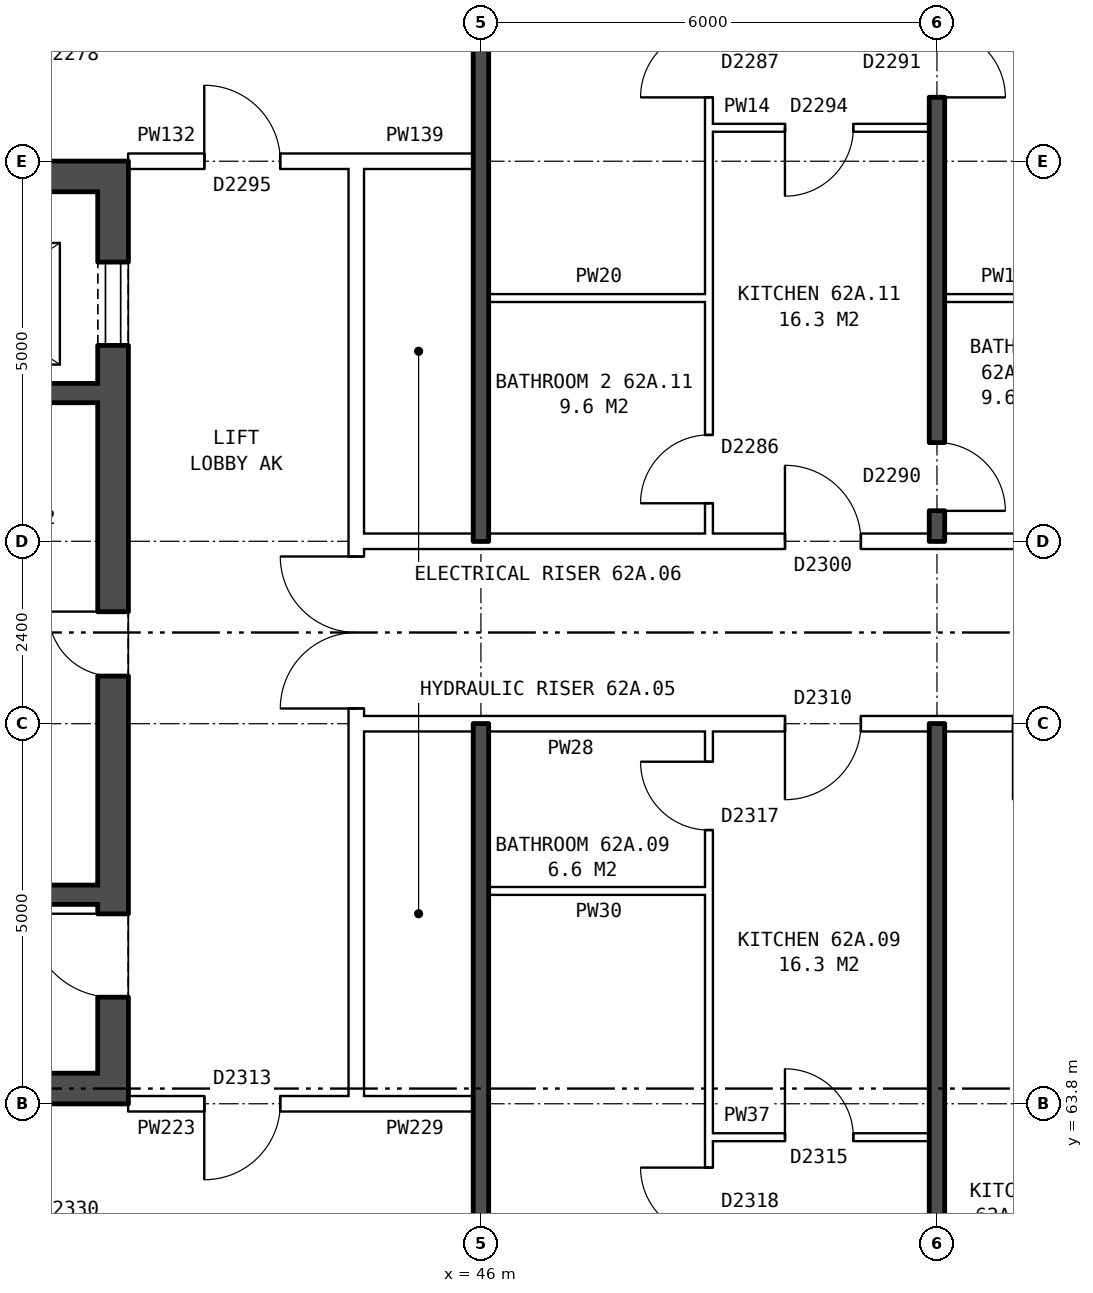
"""IFC4 building model, lengths in metres.
Left out: names, types, materials, properties, quantities, classifications, styles, units other than length and angle.
Written with IfcOpenShell. Run it as: python <this file> out.ifc"""

import sys

from ifc_helpers import new_model, si_unit, direction, frame, frame_2d, origin, place, context, subcontext, project, spatial, rectangle, extrude, element, fill, save


model = new_model("IFC4")
c1 = context("Model", 3, precision=1e-05, world=origin(), true_north=direction((0.0, 1.0)))
c2 = subcontext(c1, "Body", "Model", "MODEL_VIEW")
j1 = project(units=[si_unit("LENGTHUNIT", "METRE"), si_unit("PLANEANGLEUNIT", "RADIAN")], contexts=[c1])
p1 = place(None, origin())
s1 = spatial("IfcSite", under=j1, at=p1, CompositionType="ELEMENT")
p2 = place(p1, origin())
s2 = spatial("IfcBuilding", under=s1, at=p2, CompositionType="ELEMENT")
p3 = place(p2, frame((0.0, 0.0, 221.4)))
s3 = spatial("IfcBuildingStorey", under=s2, at=p3, CompositionType="ELEMENT", Elevation=221.4)
p4 = place(p3, frame((41.16, 76.2, 0.0), z_axis=(0.0, 0.0, 1.0), x_axis=(0.0, -1.0, 0.0)))
e1 = element("IfcWall", 1, at=p4, inside=s3, PredefinedType="SHEAR", context=c2, shape_type="SweptSolid", body=[
    extrude(rectangle(XDim=12.4, YDim=0.4, at=frame_2d((6.2, 0.0))), origin(), (0.0, 0.0, 1.0), 2.85),
])
p5 = place(p4, frame((1.325, 0.0, 0.0)))
e2 = element("IfcOpeningElement", 2, at=p5, cuts=e1, PredefinedType="OPENING", context=c2, shape_type="SweptSolid", body=[
    extrude(rectangle(XDim=1.1, YDim=2.1, at=frame_2d((0.55, 1.05))), frame((0.0, 0.21, 0.0), z_axis=(0.0, -1.0, 0.0), x_axis=(1.0, 0.0, 0.0)), (0.0, 0.0, 1.0), 0.42),
])
p6 = place(p4, frame((5.925, 0.0, 0.0)))
e3 = element("IfcOpeningElement", 3, at=p6, cuts=e1, PredefinedType="OPENING", context=c2, shape_type="SweptSolid", body=[
    extrude(rectangle(XDim=0.85, YDim=2.1, at=frame_2d((0.425, 1.05))), frame((0.0, 0.21, 0.0), z_axis=(0.0, -1.0, 0.0), x_axis=(1.0, 0.0, 0.0)), (0.0, 0.0, 1.0), 0.42),
])
p7 = place(p4, frame((9.9, 0.0, 0.0)))
e4 = element("IfcOpeningElement", 4, at=p7, cuts=e1, PredefinedType="OPENING", context=c2, shape_type="SweptSolid", body=[
    extrude(rectangle(XDim=1.1, YDim=2.1, at=frame_2d((0.55, 1.05))), frame((0.0, 0.21, 0.0), z_axis=(0.0, -1.0, 0.0), x_axis=(1.0, 0.0, 0.0)), (0.0, 0.0, 1.0), 0.42),
])
for number, where, z_axis, x_axis in (
    (5, (40.96, 76.0, 0.0), (0.0, 0.0, 1.0), (-1.0, 0.0, 0.0)),
    (6, (40.96, 64.0, 0.0), (0.0, 0.0, 1.0), (-1.0, 0.0, 0.0)),
):
    element("IfcWall", number, at=place(p3, frame(where, z_axis=z_axis, x_axis=x_axis)), inside=s3, PredefinedType="SHEAR", context=c2, shape_type="SweptSolid", body=[
        extrude(rectangle(XDim=8.2, YDim=0.4, at=frame_2d((4.1, 0.0))), origin(), (0.0, 0.0, 1.0), 2.85),
    ])
p8 = place(p3, frame((40.96, 73.15, 0.0), z_axis=(0.0, 0.0, 1.0), x_axis=(-1.0, 0.0, 0.0)))
e7 = element("IfcWall", 7, at=p8, inside=s3, PredefinedType="SHEAR", context=c2, shape_type="SweptSolid", body=[
    extrude(rectangle(XDim=3.595, YDim=0.25, at=frame_2d((1.797, 0.0))), origin(), (0.0, 0.0, 1.0), 2.85),
])
p9 = place(p3, frame((40.96, 66.55, 0.0), z_axis=(0.0, 0.0, 1.0), x_axis=(-1.0, 0.0, 0.0)))
e8 = element("IfcWall", 8, at=p9, inside=s3, PredefinedType="SHEAR", context=c2, shape_type="SweptSolid", body=[
    extrude(rectangle(XDim=2.525, YDim=0.25, at=frame_2d((1.262, 0.0))), origin(), (0.0, 0.0, 1.0), 2.85),
])
p10 = place(p3, frame((44.36, 63.9, 0.0), z_axis=(0.0, 0.0, 1.0), x_axis=(0.0, 1.0, 0.0)))
e9 = element("IfcWall", 9, at=p10, inside=s3, PredefinedType="PARTITIONING", context=c2, shape_type="SweptSolid", body=[
    extrude(rectangle(XDim=12.2, YDim=0.2, at=frame_2d((6.1, 0.0))), origin(), (0.0, 0.0, 1.0), 2.85),
])
p11 = place(p10, frame((5.1, 0.0, 0.0)))
e10 = element("IfcOpeningElement", 10, at=p11, cuts=e9, PredefinedType="OPENING", context=c2, shape_type="SweptSolid", body=[
    extrude(rectangle(XDim=2.0, YDim=2.1, at=frame_2d((1.0, 1.05))), frame((0.0, 0.11, 0.0), z_axis=(0.0, -1.0, 0.0), x_axis=(1.0, 0.0, 0.0)), (0.0, 0.0, 1.0), 0.22),
])
p12 = place(p3, frame((49.0, 63.36, 0.0), z_axis=(0.0, 0.0, 1.0), x_axis=(1.0, 0.0, 0.0)))
e11 = element("IfcWall", 11, at=p12, inside=s3, PredefinedType="PARTITIONING", context=c2, shape_type="SweptSolid", body=[
    extrude(rectangle(XDim=2.9, YDim=0.1, at=frame_2d((1.45, 0.0))), origin(), (0.0, 0.0, 1.0), 2.85),
])
p13 = place(p12, frame((1.0, 0.0, 0.0)))
e12 = element("IfcOpeningElement", 12, at=p13, cuts=e11, PredefinedType="OPENING", context=c2, shape_type="SweptSolid", body=[
    extrude(rectangle(XDim=0.9, YDim=2.1, at=frame_2d((0.45, 1.05))), frame((0.0, 0.06, 0.0), z_axis=(0.0, -1.0, 0.0), x_axis=(1.0, 0.0, 0.0)), (0.0, 0.0, 1.0), 0.12),
])
p14 = place(p3, frame((41.36, 63.8, 0.0), z_axis=(0.0, 0.0, 1.0), x_axis=(1.0, 0.0, 0.0)))
e13 = element("IfcWall", 13, at=p14, inside=s3, PredefinedType="PARTITIONING", context=c2, shape_type="SweptSolid", body=[
    extrude(rectangle(XDim=3.0, YDim=0.2, at=frame_2d((1.5, 0.0))), origin(), (0.0, 0.0, 1.0), 2.85),
])
p15 = place(p14, frame((1.0, 0.0, 0.0)))
e14 = element("IfcOpeningElement", 14, at=p15, cuts=e13, PredefinedType="OPENING", context=c2, shape_type="SweptSolid", body=[
    extrude(rectangle(XDim=1.0, YDim=2.1, at=frame_2d((0.5, 1.05))), frame((0.0, 0.11, 0.0), z_axis=(0.0, -1.0, 0.0), x_axis=(1.0, 0.0, 0.0)), (0.0, 0.0, 1.0), 0.22),
])
p16 = place(p3, frame((44.36, 63.8, 0.0), z_axis=(0.0, 0.0, 1.0), x_axis=(1.0, 0.0, 0.0)))
e15 = element("IfcWall", 15, at=p16, inside=s3, PredefinedType="PARTITIONING", context=c2, shape_type="SweptSolid", body=[
    extrude(rectangle(XDim=1.54, YDim=0.2, at=frame_2d((0.77, 0.0))), origin(), (0.0, 0.0, 1.0), 2.85),
])
p17 = place(p3, frame((46.1, 66.6, 0.0), z_axis=(0.0, 0.0, 1.0), x_axis=(1.0, 0.0, 0.0)))
e16 = element("IfcWall", 16, at=p17, inside=s3, PredefinedType="PARTITIONING", context=c2, shape_type="SweptSolid", body=[
    extrude(rectangle(XDim=2.9, YDim=0.1, at=frame_2d((1.45, 0.0))), origin(), (0.0, 0.0, 1.0), 2.85),
])
p18 = place(p3, frame((44.36, 68.8, 0.0), z_axis=(0.0, 0.0, 1.0), x_axis=(1.0, 0.0, 0.0)))
e17 = element("IfcWall", 17, at=p18, inside=s3, PredefinedType="PARTITIONING", context=c2, shape_type="SweptSolid", body=[
    extrude(rectangle(XDim=19.28, YDim=0.2, at=frame_2d((9.64, 0.0))), origin(), (0.0, 0.0, 1.0), 2.85),
])
p19 = place(p18, frame((14.64, 0.0, 0.0)))
e18 = element("IfcOpeningElement", 18, at=p19, cuts=e17, PredefinedType="OPENING", context=c2, shape_type="SweptSolid", body=[
    extrude(rectangle(XDim=1.0, YDim=2.1, at=frame_2d((0.5, 1.05))), frame((0.0, 0.11, 0.0), z_axis=(0.0, -1.0, 0.0), x_axis=(1.0, 0.0, 0.0)), (0.0, 0.0, 1.0), 0.22),
])
p20 = place(p18, frame((8.64, 0.0, 0.0)))
e19 = element("IfcOpeningElement", 19, at=p20, cuts=e17, PredefinedType="OPENING", context=c2, shape_type="SweptSolid", body=[
    extrude(rectangle(XDim=1.0, YDim=2.1, at=frame_2d((0.5, 1.05))), frame((0.0, 0.11, 0.0), z_axis=(0.0, -1.0, 0.0), x_axis=(1.0, 0.0, 0.0)), (0.0, 0.0, 1.0), 0.22),
])
p21 = place(p18, frame((5.64, 0.0, 0.0)))
e20 = element("IfcOpeningElement", 20, at=p21, cuts=e17, PredefinedType="OPENING", context=c2, shape_type="SweptSolid", body=[
    extrude(rectangle(XDim=1.0, YDim=2.1, at=frame_2d((0.5, 1.05))), frame((0.0, 0.11, 0.0), z_axis=(0.0, -1.0, 0.0), x_axis=(1.0, 0.0, 0.0)), (0.0, 0.0, 1.0), 0.22),
])
p22 = place(p3, frame((44.36, 71.2, 0.0), z_axis=(0.0, 0.0, 1.0), x_axis=(1.0, 0.0, 0.0)))
e21 = element("IfcWall", 21, at=p22, inside=s3, PredefinedType="PARTITIONING", context=c2, shape_type="SweptSolid", body=[
    extrude(rectangle(XDim=19.28, YDim=0.2, at=frame_2d((9.64, 0.0))), origin(), (0.0, 0.0, 1.0), 2.85),
])
p23 = place(p22, frame((14.64, 0.0, 0.0)))
e22 = element("IfcOpeningElement", 22, at=p23, cuts=e21, PredefinedType="OPENING", context=c2, shape_type="SweptSolid", body=[
    extrude(rectangle(XDim=1.0, YDim=2.1, at=frame_2d((0.5, 1.05))), frame((0.0, 0.11, 0.0), z_axis=(0.0, -1.0, 0.0), x_axis=(1.0, 0.0, 0.0)), (0.0, 0.0, 1.0), 0.22),
])
p24 = place(p22, frame((5.64, 0.0, 0.0)))
e23 = element("IfcOpeningElement", 23, at=p24, cuts=e21, PredefinedType="OPENING", context=c2, shape_type="SweptSolid", body=[
    extrude(rectangle(XDim=1.0, YDim=2.1, at=frame_2d((0.5, 1.05))), frame((0.0, 0.11, 0.0), z_axis=(0.0, -1.0, 0.0), x_axis=(1.0, 0.0, 0.0)), (0.0, 0.0, 1.0), 0.22),
])
p25 = place(p3, frame((46.1, 74.4, 0.0), z_axis=(0.0, 0.0, 1.0), x_axis=(1.0, 0.0, 0.0)))
e24 = element("IfcWall", 24, at=p25, inside=s3, PredefinedType="PARTITIONING", context=c2, shape_type="SweptSolid", body=[
    extrude(rectangle(XDim=2.9, YDim=0.1, at=frame_2d((1.45, 0.0))), origin(), (0.0, 0.0, 1.0), 2.85),
])
p26 = place(p3, frame((52.1, 74.4, 0.0), z_axis=(0.0, 0.0, 1.0), x_axis=(1.0, 0.0, 0.0)))
e25 = element("IfcWall", 25, at=p26, inside=s3, PredefinedType="PARTITIONING", context=c2, shape_type="SweptSolid", body=[
    extrude(rectangle(XDim=2.8, YDim=0.1, at=frame_2d((1.4, 0.0))), origin(), (0.0, 0.0, 1.0), 2.85),
])
p27 = place(p3, frame((41.36, 76.2, 0.0), z_axis=(0.0, 0.0, 1.0), x_axis=(1.0, 0.0, 0.0)))
e26 = element("IfcWall", 26, at=p27, inside=s3, PredefinedType="PARTITIONING", context=c2, shape_type="SweptSolid", body=[
    extrude(rectangle(XDim=3.0, YDim=0.2, at=frame_2d((1.5, 0.0))), origin(), (0.0, 0.0, 1.0), 2.85),
])
p28 = place(p27, frame((1.0, 0.0, 0.0)))
e27 = element("IfcOpeningElement", 27, at=p28, cuts=e26, PredefinedType="OPENING", context=c2, shape_type="SweptSolid", body=[
    extrude(rectangle(XDim=1.0, YDim=2.1, at=frame_2d((0.5, 1.05))), frame((0.0, 0.11, 0.0), z_axis=(0.0, -1.0, 0.0), x_axis=(1.0, 0.0, 0.0)), (0.0, 0.0, 1.0), 0.22),
])
p29 = place(p3, frame((44.36, 76.2, 0.0), z_axis=(0.0, 0.0, 1.0), x_axis=(1.0, 0.0, 0.0)))
e28 = element("IfcWall", 28, at=p29, inside=s3, PredefinedType="PARTITIONING", context=c2, shape_type="SweptSolid", body=[
    extrude(rectangle(XDim=1.54, YDim=0.2, at=frame_2d((0.77, 0.0))), origin(), (0.0, 0.0, 1.0), 2.85),
])
p30 = place(p3, frame((49.0, 76.64, 0.0), z_axis=(0.0, 0.0, 1.0), x_axis=(1.0, 0.0, 0.0)))
e29 = element("IfcWall", 29, at=p30, inside=s3, PredefinedType="PARTITIONING", context=c2, shape_type="SweptSolid", body=[
    extrude(rectangle(XDim=2.9, YDim=0.1, at=frame_2d((1.45, 0.0))), origin(), (0.0, 0.0, 1.0), 2.85),
])
p31 = place(p30, frame((1.0, 0.0, 0.0)))
e30 = element("IfcOpeningElement", 30, at=p31, cuts=e29, PredefinedType="OPENING", context=c2, shape_type="SweptSolid", body=[
    extrude(rectangle(XDim=0.9, YDim=2.1, at=frame_2d((0.45, 1.05))), frame((0.0, 0.06, 0.0), z_axis=(0.0, -1.0, 0.0), x_axis=(1.0, 0.0, 0.0)), (0.0, 0.0, 1.0), 0.12),
])
for number, where, z_axis, x_axis in (
    (31, (46.0, 54.36, 0.0), (0.0, 0.0, 1.0), (0.0, 1.0, 0.0)),
    (32, (46.0, 71.2, 0.0), (0.0, 0.0, 1.0), (0.0, 1.0, 0.0)),
):
    element("IfcWall", number, at=place(p3, frame(where, z_axis=z_axis, x_axis=x_axis)), inside=s3, PredefinedType="SOLIDWALL", context=c2, shape_type="SweptSolid", body=[
        extrude(rectangle(XDim=14.44, YDim=0.2, at=frame_2d((7.22, 0.0))), origin(), (0.0, 0.0, 1.0), 2.85),
    ])
p32 = place(p3, frame((49.0, 54.36, 0.0), z_axis=(0.0, 0.0, 1.0), x_axis=(0.0, 1.0, 0.0)))
e33 = element("IfcWall", 33, at=p32, inside=s3, PredefinedType="PARTITIONING", context=c2, shape_type="SweptSolid", body=[
    extrude(rectangle(XDim=14.34, YDim=0.1, at=frame_2d((7.17, 0.0))), origin(), (0.0, 0.0, 1.0), 2.85),
])
p33 = place(p32, frame((7.7, 0.0, 0.0)))
e34 = element("IfcOpeningElement", 34, at=p33, cuts=e33, PredefinedType="OPENING", context=c2, shape_type="SweptSolid", body=[
    extrude(rectangle(XDim=0.9, YDim=2.1, at=frame_2d((0.45, 1.05))), frame((0.0, 0.06, 0.0), z_axis=(0.0, -1.0, 0.0), x_axis=(1.0, 0.0, 0.0)), (0.0, 0.0, 1.0), 0.12),
])
p34 = place(p32, frame((13.04, 0.0, 0.0)))
e35 = element("IfcOpeningElement", 35, at=p34, cuts=e33, PredefinedType="OPENING", context=c2, shape_type="SweptSolid", body=[
    extrude(rectangle(XDim=0.9, YDim=2.1, at=frame_2d((0.45, 1.05))), frame((0.0, 0.06, 0.0), z_axis=(0.0, -1.0, 0.0), x_axis=(1.0, 0.0, 0.0)), (0.0, 0.0, 1.0), 0.12),
])
p35 = place(p3, frame((49.0, 71.3, 0.0), z_axis=(0.0, 0.0, 1.0), x_axis=(0.0, 1.0, 0.0)))
e36 = element("IfcWall", 36, at=p35, inside=s3, PredefinedType="PARTITIONING", context=c2, shape_type="SweptSolid", body=[
    extrude(rectangle(XDim=14.34, YDim=0.1, at=frame_2d((7.17, 0.0))), origin(), (0.0, 0.0, 1.0), 2.85),
])
p36 = place(p35, frame((5.74, 0.0, 0.0)))
e37 = element("IfcOpeningElement", 37, at=p36, cuts=e36, PredefinedType="OPENING", context=c2, shape_type="SweptSolid", body=[
    extrude(rectangle(XDim=0.9, YDim=2.1, at=frame_2d((0.45, 1.05))), frame((0.0, 0.06, 0.0), z_axis=(0.0, -1.0, 0.0), x_axis=(1.0, 0.0, 0.0)), (0.0, 0.0, 1.0), 0.12),
])
p37 = place(p35, frame((0.4, 0.0, 0.0)))
e38 = element("IfcOpeningElement", 38, at=p37, cuts=e36, PredefinedType="OPENING", context=c2, shape_type="SweptSolid", body=[
    extrude(rectangle(XDim=0.9, YDim=2.1, at=frame_2d((0.45, 1.05))), frame((0.0, 0.06, 0.0), z_axis=(0.0, -1.0, 0.0), x_axis=(1.0, 0.0, 0.0)), (0.0, 0.0, 1.0), 0.12),
])
p38 = place(p3, frame((52.0, 54.36, 0.0), z_axis=(0.0, 0.0, 1.0), x_axis=(0.0, 1.0, 0.0)))
e39 = element("IfcWall", 39, at=p38, inside=s3, PredefinedType="SOLIDWALL", context=c2, shape_type="SweptSolid", body=[
    extrude(rectangle(XDim=14.44, YDim=0.2, at=frame_2d((7.22, 0.0))), origin(), (0.0, 0.0, 1.0), 2.85),
])
p39 = place(p3, frame((52.0, 71.2, 0.0), z_axis=(0.0, 0.0, 1.0), x_axis=(0.0, 1.0, 0.0)))
e40 = element("IfcWall", 40, at=p39, inside=s3, PredefinedType="SOLIDWALL", context=c2, shape_type="SweptSolid", body=[
    extrude(rectangle(XDim=14.44, YDim=0.2, at=frame_2d((7.22, 0.0))), origin(), (0.0, 0.0, 1.0), 2.85),
])
p40 = place(p39, frame((5.84, 0.0, 0.0)))
e41 = element("IfcOpeningElement", 41, at=p40, cuts=e40, PredefinedType="OPENING", context=c2, shape_type="SweptSolid", body=[
    extrude(rectangle(XDim=0.9, YDim=2.1, at=frame_2d((0.45, 1.05))), frame((0.0, 0.11, 0.0), z_axis=(0.0, -1.0, 0.0), x_axis=(1.0, 0.0, 0.0)), (0.0, 0.0, 1.0), 0.22),
])
p41 = place(p39, frame((0.4, 0.0, 0.0)))
e42 = element("IfcOpeningElement", 42, at=p41, cuts=e40, PredefinedType="OPENING", context=c2, shape_type="SweptSolid", body=[
    extrude(rectangle(XDim=0.9, YDim=2.1, at=frame_2d((0.45, 1.05))), frame((0.0, 0.11, 0.0), z_axis=(0.0, -1.0, 0.0), x_axis=(1.0, 0.0, 0.0)), (0.0, 0.0, 1.0), 0.22),
])
p42 = place(p5, origin())
e43 = element("IfcDoor", 43, at=p42, inside=s3, OperationType="DOUBLE_DOOR_SLIDING", PredefinedType="DOOR", context=c2, shape_type="SweptSolid", body=[
    extrude(rectangle(XDim=1.1, YDim=2.1, at=frame_2d((0.55, 1.05))), frame((0.0, -0.135, 0.0), z_axis=(0.0, -1.0, 0.0), x_axis=(1.0, 0.0, 0.0)), (0.0, 0.0, 1.0), 0.05),
])
fill(e2, e43)
p43 = place(p6, frame((0.85, 0.0, 0.0), z_axis=(0.0, 0.0, 1.0), x_axis=(-1.0, 0.0, 0.0)))
e44 = element("IfcDoor", 44, at=p43, inside=s3, OperationType="SINGLE_SWING_RIGHT", PredefinedType="DOOR", context=c2, shape_type="SweptSolid", body=[
    extrude(rectangle(XDim=0.85, YDim=2.1, at=frame_2d((0.425, 1.05))), frame((0.0, 0.185, 0.0), z_axis=(0.0, -1.0, 0.0), x_axis=(1.0, 0.0, 0.0)), (0.0, 0.0, 1.0), 0.05),
])
fill(e3, e44)
p44 = place(p7, frame((1.1, 0.0, 0.0), z_axis=(0.0, 0.0, 1.0), x_axis=(-1.0, 0.0, 0.0)))
e45 = element("IfcDoor", 45, at=p44, inside=s3, OperationType="SINGLE_SWING_RIGHT", PredefinedType="DOOR", context=c2, shape_type="SweptSolid", body=[
    extrude(rectangle(XDim=1.1, YDim=2.1, at=frame_2d((0.55, 1.05))), frame((0.0, 0.185, 0.0), z_axis=(0.0, -1.0, 0.0), x_axis=(1.0, 0.0, 0.0)), (0.0, 0.0, 1.0), 0.05),
])
fill(e4, e45)
p45 = place(p11, origin())
e46 = element("IfcDoor", 46, at=p45, inside=s3, OperationType="DOUBLE_DOOR_SINGLE_SWING", PredefinedType="DOOR", context=c2, shape_type="SweptSolid", body=[
    extrude(rectangle(XDim=2.0, YDim=2.1, at=frame_2d((1.0, 1.05))), frame((0.0, 0.025, 0.0), z_axis=(0.0, -1.0, 0.0), x_axis=(1.0, 0.0, 0.0)), (0.0, 0.0, 1.0), 0.05),
])
fill(e10, e46)
p46 = place(p15, frame((1.0, 0.0, 0.0), z_axis=(0.0, 0.0, 1.0), x_axis=(-1.0, 0.0, 0.0)))
e47 = element("IfcDoor", 47, at=p46, inside=s3, OperationType="SINGLE_SWING_RIGHT", PredefinedType="DOOR", context=c2, shape_type="SweptSolid", body=[
    extrude(rectangle(XDim=1.0, YDim=2.1, at=frame_2d((0.5, 1.05))), frame((0.0, 0.025, 0.0), z_axis=(0.0, -1.0, 0.0), x_axis=(1.0, 0.0, 0.0)), (0.0, 0.0, 1.0), 0.05),
])
fill(e14, e47)
p47 = place(p28, origin())
e48 = element("IfcDoor", 48, at=p47, inside=s3, OperationType="SINGLE_SWING_LEFT", PredefinedType="DOOR", context=c2, shape_type="SweptSolid", body=[
    extrude(rectangle(XDim=1.0, YDim=2.1, at=frame_2d((0.5, 1.05))), frame((0.0, 0.025, 0.0), z_axis=(0.0, -1.0, 0.0), x_axis=(1.0, 0.0, 0.0)), (0.0, 0.0, 1.0), 0.05),
])
fill(e27, e48)
p48 = place(p33, origin())
e49 = element("IfcDoor", 49, at=p48, inside=s3, OperationType="SINGLE_SWING_RIGHT", PredefinedType="DOOR", context=c2, shape_type="SweptSolid", body=[
    extrude(rectangle(XDim=0.9, YDim=2.1, at=frame_2d((0.45, 1.05))), frame((0.0, 0.025, 0.0), z_axis=(0.0, -1.0, 0.0), x_axis=(1.0, 0.0, 0.0)), (0.0, 0.0, 1.0), 0.05),
])
fill(e34, e49)
p49 = place(p21, frame((1.0, 0.0, 0.0), z_axis=(0.0, 0.0, 1.0), x_axis=(-1.0, 0.0, 0.0)))
e50 = element("IfcDoor", 50, at=p49, inside=s3, OperationType="SINGLE_SWING_RIGHT", PredefinedType="DOOR", context=c2, shape_type="SweptSolid", body=[
    extrude(rectangle(XDim=1.0, YDim=2.1, at=frame_2d((0.5, 1.05))), frame((0.0, 0.025, 0.0), z_axis=(0.0, -1.0, 0.0), x_axis=(1.0, 0.0, 0.0)), (0.0, 0.0, 1.0), 0.05),
])
fill(e20, e50)
p50 = place(p13, origin())
e51 = element("IfcDoor", 51, at=p50, inside=s3, OperationType="SINGLE_SWING_LEFT", PredefinedType="DOOR", context=c2, shape_type="SweptSolid", body=[
    extrude(rectangle(XDim=0.9, YDim=2.1, at=frame_2d((0.45, 1.05))), frame((0.0, 0.025, 0.0), z_axis=(0.0, -1.0, 0.0), x_axis=(1.0, 0.0, 0.0)), (0.0, 0.0, 1.0), 0.05),
])
fill(e12, e51)
p51 = place(p34, origin())
e52 = element("IfcDoor", 52, at=p51, inside=s3, OperationType="SINGLE_SWING_RIGHT", PredefinedType="DOOR", context=c2, shape_type="SweptSolid", body=[
    extrude(rectangle(XDim=0.9, YDim=2.1, at=frame_2d((0.45, 1.05))), frame((0.0, 0.025, 0.0), z_axis=(0.0, -1.0, 0.0), x_axis=(1.0, 0.0, 0.0)), (0.0, 0.0, 1.0), 0.05),
])
fill(e35, e52)
p52 = place(p40, frame((0.9, 0.0, 0.0), z_axis=(0.0, 0.0, 1.0), x_axis=(-1.0, 0.0, 0.0)))
e53 = element("IfcDoor", 53, at=p52, inside=s3, OperationType="SINGLE_SWING_RIGHT", PredefinedType="DOOR", context=c2, shape_type="SweptSolid", body=[
    extrude(rectangle(XDim=0.9, YDim=2.1, at=frame_2d((0.45, 1.05))), frame((0.0, 0.025, 0.0), z_axis=(0.0, -1.0, 0.0), x_axis=(1.0, 0.0, 0.0)), (0.0, 0.0, 1.0), 0.05),
])
fill(e41, e53)
p53 = place(p36, origin())
e54 = element("IfcDoor", 54, at=p53, inside=s3, OperationType="SINGLE_SWING_LEFT", PredefinedType="DOOR", context=c2, shape_type="SweptSolid", body=[
    extrude(rectangle(XDim=0.9, YDim=2.1, at=frame_2d((0.45, 1.05))), frame((0.0, 0.025, 0.0), z_axis=(0.0, -1.0, 0.0), x_axis=(1.0, 0.0, 0.0)), (0.0, 0.0, 1.0), 0.05),
])
fill(e37, e54)
p54 = place(p24, origin())
e55 = element("IfcDoor", 55, at=p54, inside=s3, OperationType="SINGLE_SWING_LEFT", PredefinedType="DOOR", context=c2, shape_type="SweptSolid", body=[
    extrude(rectangle(XDim=1.0, YDim=2.1, at=frame_2d((0.5, 1.05))), frame((0.0, 0.025, 0.0), z_axis=(0.0, -1.0, 0.0), x_axis=(1.0, 0.0, 0.0)), (0.0, 0.0, 1.0), 0.05),
])
fill(e23, e55)
p55 = place(p31, frame((0.9, 0.0, 0.0), z_axis=(0.0, 0.0, 1.0), x_axis=(-1.0, 0.0, 0.0)))
e56 = element("IfcDoor", 56, at=p55, inside=s3, OperationType="SINGLE_SWING_RIGHT", PredefinedType="DOOR", context=c2, shape_type="SweptSolid", body=[
    extrude(rectangle(XDim=0.9, YDim=2.1, at=frame_2d((0.45, 1.05))), frame((0.0, 0.025, 0.0), z_axis=(0.0, -1.0, 0.0), x_axis=(1.0, 0.0, 0.0)), (0.0, 0.0, 1.0), 0.05),
])
fill(e30, e56)
p56 = place(p41, frame((0.9, 0.0, 0.0), z_axis=(0.0, 0.0, 1.0), x_axis=(-1.0, 0.0, 0.0)))
e57 = element("IfcDoor", 57, at=p56, inside=s3, OperationType="SINGLE_SWING_RIGHT", PredefinedType="DOOR", context=c2, shape_type="SweptSolid", body=[
    extrude(rectangle(XDim=0.9, YDim=2.1, at=frame_2d((0.45, 1.05))), frame((0.0, 0.025, 0.0), z_axis=(0.0, -1.0, 0.0), x_axis=(1.0, 0.0, 0.0)), (0.0, 0.0, 1.0), 0.05),
])
fill(e42, e57)
p57 = place(p37, origin())
e58 = element("IfcDoor", 58, at=p57, inside=s3, OperationType="SINGLE_SWING_LEFT", PredefinedType="DOOR", context=c2, shape_type="SweptSolid", body=[
    extrude(rectangle(XDim=0.9, YDim=2.1, at=frame_2d((0.45, 1.05))), frame((0.0, 0.025, 0.0), z_axis=(0.0, -1.0, 0.0), x_axis=(1.0, 0.0, 0.0)), (0.0, 0.0, 1.0), 0.05),
])
fill(e38, e58)
save(model, sys.argv[1])
